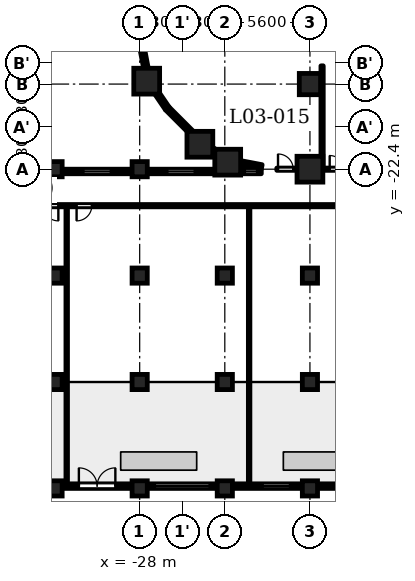
"""IFC4 building model, lengths in metres.
Left out: names, types, materials, properties, quantities, classifications, styles, units other than length and angle.
Written with IfcOpenShell. Run it as: python <this file> out.ifc"""

import sys

from ifc_helpers import new_model, si_unit, direction, frame, frame_2d, origin, origin_2d, place, context, subcontext, project, spatial, polyline, rectangle, circle, outline, extrude, element, fill, save


model = new_model("IFC4")
c1 = context("Model", 3, precision=1e-05, world=origin(), true_north=direction((0.0, 1.0)))
c2 = subcontext(c1, "Body", "Model", "MODEL_VIEW")
j1 = project(units=[si_unit("LENGTHUNIT", "METRE"), si_unit("PLANEANGLEUNIT", "RADIAN")], contexts=[c1])
p1 = place(None, origin())
s1 = spatial("IfcSite", under=j1, at=p1, CompositionType="ELEMENT")
p2 = place(p1, origin())
s2 = spatial("IfcBuilding", under=s1, at=p2, CompositionType="ELEMENT")
p3 = place(p2, frame((0.0, 0.0, 16.1)))
s3 = spatial("IfcBuildingStorey", under=s2, at=p3, CompositionType="ELEMENT", Elevation=16.1)
for number, where, z_axis, x_axis in (
    (1, (-22.209, -21.938, 0.0), (0.0, 0.0, 1.0), (1.0, 0.0, 0.0)),
    (2, (-16.8, -22.4, 0.0), (0.0, 0.0, 1.0), (1.0, 0.0, 0.0)),
    (3, (-27.538, -16.609, 0.0), (0.0, 0.0, 1.0), (1.0, 0.0, 0.0)),
    (4, (-24.04, -20.76, 0.0), (0.0, 0.0, 1.0), (1.0, 0.0, 0.0)),
):
    element("IfcColumn", number, at=place(p3, frame(where, z_axis=z_axis, x_axis=x_axis)), inside=s3, PredefinedType="COLUMN", context=c2, shape_type="SweptSolid", body=[
        extrude(rectangle(XDim=1.7, YDim=1.7, at=origin_2d()), origin(), (0.0, 0.0, 1.0), 4.8),
    ])
p4 = place(p3, frame((-16.8, -16.8, 0.0), z_axis=(0.0, 0.0, 1.0), x_axis=(1.0, 0.0, 0.0)))
e5 = element("IfcColumn", 5, at=p4, inside=s3, PredefinedType="COLUMN", context=c2, shape_type="SweptSolid", body=[
    extrude(rectangle(XDim=1.4, YDim=1.4, at=origin_2d()), origin(), (0.0, 0.0, 1.0), 4.8),
])
for number, where, z_axis, x_axis in (
    (6, (-33.6, -29.4, 0.0), (0.0, 0.0, 1.0), (1.0, 0.0, 0.0)),
    (7, (-28.0, -29.4, 0.0), (0.0, 0.0, 1.0), (1.0, 0.0, 0.0)),
    (8, (-22.4, -29.4, 0.0), (0.0, 0.0, 1.0), (1.0, 0.0, 0.0)),
    (9, (-16.8, -29.4, 0.0), (0.0, 0.0, 1.0), (1.0, 0.0, 0.0)),
    (10, (-33.6, -36.4, 0.0), (0.0, 0.0, 1.0), (1.0, 0.0, 0.0)),
    (11, (-28.0, -36.4, 0.0), (0.0, 0.0, 1.0), (1.0, 0.0, 0.0)),
    (12, (-22.4, -36.4, 0.0), (0.0, 0.0, 1.0), (1.0, 0.0, 0.0)),
    (13, (-16.8, -36.4, 0.0), (0.0, 0.0, 1.0), (1.0, 0.0, 0.0)),
    (14, (-33.6, -43.4, 0.0), (0.0, 0.0, 1.0), (1.0, 0.0, 0.0)),
    (15, (-28.0, -43.4, 0.0), (0.0, 0.0, 1.0), (1.0, 0.0, 0.0)),
    (16, (-22.4, -43.4, 0.0), (0.0, 0.0, 1.0), (1.0, 0.0, 0.0)),
    (17, (-16.8, -43.4, 0.0), (0.0, 0.0, 1.0), (1.0, 0.0, 0.0)),
    (18, (-33.6, -22.4, 0.0), (0.0, 0.0, 1.0), (1.0, 0.0, 0.0)),
    (19, (-28.0, -22.4, 0.0), (0.0, 0.0, 1.0), (1.0, 0.0, 0.0)),
):
    element("IfcColumn", number, at=place(p3, frame(where, z_axis=z_axis, x_axis=x_axis)), inside=s3, PredefinedType="COLUMN", context=c2, shape_type="SweptSolid", body=[
        extrude(circle(Radius=0.5, at=origin_2d()), origin(), (0.0, 0.0, 1.0), 4.8),
    ])
for number, where, z_axis, x_axis in (
    (20, (-27.853, -14.372, 0.0), (0.0, 0.0, 1.0), (0.187, -0.982, 0.0)),
    (21, (-26.969, -17.25, 0.0), (0.0, 0.0, 1.0), (0.562, -0.827, 0.0)),
):
    element("IfcWall", number, at=place(p3, frame(where, z_axis=z_axis, x_axis=x_axis)), inside=s3, PredefinedType="SOLIDWALL", context=c2, shape_type="SweptSolid", body=[
        extrude(rectangle(XDim=1.406, YDim=0.3, at=frame_2d((0.703, 0.0))), origin(), (0.0, 0.0, 1.0), 3.55),
    ])
p5 = place(p3, frame((-26.197, -18.391, 0.0), z_axis=(0.0, 0.0, 1.0), x_axis=(0.707054835785, -0.707158722772, 0.0)))
e22 = element("IfcWall", 22, at=p5, inside=s3, PredefinedType="SOLIDWALL", context=c2, shape_type="SweptSolid", body=[
    extrude(rectangle(XDim=2.35, YDim=0.3, at=frame_2d((1.175, 0.0))), origin(), (0.0, 0.0, 1.0), 3.55),
])
p6 = place(p3, frame((-23.244, -21.101, 0.0), z_axis=(0.0, 0.0, 1.0), x_axis=(0.827135885329, -0.562001981492, 0.0)))
e23 = element("IfcWall", 23, at=p6, inside=s3, PredefinedType="SOLIDWALL", context=c2, shape_type="SweptSolid", body=[
    extrude(rectangle(XDim=0.477, YDim=0.3, at=frame_2d((0.239, 0.0))), origin(), (0.0, 0.0, 1.0), 4.45),
])
p7 = place(p3, frame((-21.353, -21.989, 0.0), z_axis=(0.0, 0.0, 1.0), x_axis=(0.98229142023, -0.187359455971, 0.0)))
e24 = element("IfcWall", 24, at=p7, inside=s3, PredefinedType="SOLIDWALL", context=c2, shape_type="SweptSolid", body=[
    extrude(rectangle(XDim=1.406, YDim=0.3, at=frame_2d((0.703, 0.0))), origin(), (0.0, 0.0, 1.0), 3.55),
])
p8 = place(p3, frame((-20.0, -22.55, 0.0), z_axis=(0.0, 0.0, 1.0), x_axis=(-1.0, 0.0, 0.0)))
e25 = element("IfcWall", 25, at=p8, inside=s3, PredefinedType="SOLIDWALL", context=c2, shape_type="SweptSolid", body=[
    extrude(rectangle(XDim=1.359, YDim=0.3, at=frame_2d((0.679, 0.0))), origin(), (0.0, 0.0, 1.0), 3.55),
])
p9 = place(p8, frame((0.279, 0.0, 0.6)))
e26 = element("IfcOpeningElement", 26, at=p9, cuts=e25, PredefinedType="OPENING", context=c2, shape_type="SweptSolid", body=[
    extrude(rectangle(XDim=0.8, YDim=1.55, at=frame_2d((0.4, 0.775))), frame((0.0, 0.16, 0.0), z_axis=(0.0, -1.0, 0.0), x_axis=(1.0, 0.0, 0.0)), (0.0, 0.0, 1.0), 0.32),
])
p10 = place(p3, frame((-23.059, -22.55, 0.0), z_axis=(0.0, 0.0, 1.0), x_axis=(-1.0, 0.0, 0.0)))
e27 = element("IfcWall", 27, at=p10, inside=s3, PredefinedType="SOLIDWALL", context=c2, shape_type="SweptSolid", body=[
    extrude(rectangle(XDim=4.441, YDim=0.3, at=frame_2d((2.221, 0.0))), origin(), (0.0, 0.0, 1.0), 4.45),
])
p11 = place(p10, frame((1.321, 0.0, 0.9)))
e28 = element("IfcOpeningElement", 28, at=p11, cuts=e27, PredefinedType="OPENING", context=c2, shape_type="SweptSolid", body=[
    extrude(rectangle(XDim=1.8, YDim=1.25, at=frame_2d((0.9, 0.625))), frame((0.0, 0.16, 0.0), z_axis=(0.0, -1.0, 0.0), x_axis=(1.0, 0.0, 0.0)), (0.0, 0.0, 1.0), 0.32),
])
p12 = place(p3, frame((-28.5, -22.55, 0.0), z_axis=(0.0, 0.0, 1.0), x_axis=(-1.0, 0.0, 0.0)))
e29 = element("IfcWall", 29, at=p12, inside=s3, PredefinedType="SOLIDWALL", context=c2, shape_type="SweptSolid", body=[
    extrude(rectangle(XDim=4.6, YDim=0.3, at=frame_2d((2.3, 0.0))), origin(), (0.0, 0.0, 1.0), 4.45),
])
p13 = place(p12, frame((1.4, 0.0, 0.9)))
e30 = element("IfcOpeningElement", 30, at=p13, cuts=e29, PredefinedType="OPENING", context=c2, shape_type="SweptSolid", body=[
    extrude(rectangle(XDim=1.8, YDim=1.25, at=frame_2d((0.9, 0.625))), frame((0.0, 0.16, 0.0), z_axis=(0.0, -1.0, 0.0), x_axis=(1.0, 0.0, 0.0)), (0.0, 0.0, 1.0), 0.32),
])
p14 = place(p3, frame((-33.1, -43.25, 0.0), z_axis=(0.0, 0.0, 1.0), x_axis=(1.0, 0.0, 0.0)))
e31 = element("IfcWall", 31, at=p14, inside=s3, PredefinedType="SOLIDWALL", context=c2, shape_type="SweptSolid", body=[
    extrude(rectangle(XDim=4.6, YDim=0.3, at=frame_2d((2.3, 0.0))), origin(), (0.0, 0.0, 1.0), 3.65),
])
p15 = place(p14, frame((1.1, 0.0, 0.0)))
e32 = element("IfcOpeningElement", 32, at=p15, cuts=e31, PredefinedType="OPENING", context=c2, shape_type="SweptSolid", body=[
    extrude(rectangle(XDim=2.4, YDim=2.3, at=frame_2d((1.2, 1.15))), frame((0.0, 0.16, 0.0), z_axis=(0.0, -1.0, 0.0), x_axis=(1.0, 0.0, 0.0)), (0.0, 0.0, 1.0), 0.32),
])
p16 = place(p3, frame((-27.5, -43.25, 0.0), z_axis=(0.0, 0.0, 1.0), x_axis=(1.0, 0.0, 0.0)))
e33 = element("IfcWall", 33, at=p16, inside=s3, PredefinedType="SOLIDWALL", context=c2, shape_type="SweptSolid", body=[
    extrude(rectangle(XDim=4.6, YDim=0.3, at=frame_2d((2.3, 0.0))), origin(), (0.0, 0.0, 1.0), 3.65),
])
p17 = place(p16, frame((0.5, 0.0, 1.2)))
e34 = element("IfcOpeningElement", 34, at=p17, cuts=e33, PredefinedType="OPENING", context=c2, shape_type="SweptSolid", body=[
    extrude(rectangle(XDim=3.6, YDim=0.95, at=frame_2d((1.8, 0.475))), frame((0.0, 0.16, 0.0), z_axis=(0.0, -1.0, 0.0), x_axis=(1.0, 0.0, 0.0)), (0.0, 0.0, 1.0), 0.32),
])
p18 = place(p3, frame((-21.9, -43.25, 0.0), z_axis=(0.0, 0.0, 1.0), x_axis=(1.0, 0.0, 0.0)))
e35 = element("IfcWall", 35, at=p18, inside=s3, PredefinedType="SOLIDWALL", context=c2, shape_type="SweptSolid", body=[
    extrude(rectangle(XDim=4.6, YDim=0.3, at=frame_2d((2.3, 0.0))), origin(), (0.0, 0.0, 1.0), 3.65),
])
p19 = place(p18, frame((1.988, 0.0, 0.9)))
e36 = element("IfcOpeningElement", 36, at=p19, cuts=e35, PredefinedType="OPENING", context=c2, shape_type="SweptSolid", body=[
    extrude(rectangle(XDim=1.8, YDim=1.25, at=frame_2d((0.9, 0.625))), frame((0.0, 0.16, 0.0), z_axis=(0.0, -1.0, 0.0), x_axis=(1.0, 0.0, 0.0)), (0.0, 0.0, 1.0), 0.32),
])
p20 = place(p3, frame((-16.3, -43.25, 0.0), z_axis=(0.0, 0.0, 1.0), x_axis=(1.0, 0.0, 0.0)))
e37 = element("IfcWall", 37, at=p20, inside=s3, PredefinedType="SOLIDWALL", context=c2, shape_type="SweptSolid", body=[
    extrude(rectangle(XDim=4.6, YDim=0.3, at=frame_2d((2.3, 0.0))), origin(), (0.0, 0.0, 1.0), 3.65),
])
p21 = place(p20, frame((1.7, 0.0, 0.6)))
e38 = element("IfcOpeningElement", 38, at=p21, cuts=e37, PredefinedType="OPENING", context=c2, shape_type="SweptSolid", body=[
    extrude(rectangle(XDim=1.2, YDim=1.55, at=frame_2d((0.6, 0.775))), frame((0.0, 0.16, 0.0), z_axis=(0.0, -1.0, 0.0), x_axis=(1.0, 0.0, 0.0)), (0.0, 0.0, 1.0), 0.32),
])
p22 = place(p3, frame((-37.0, -24.8, 0.0), z_axis=(0.0, 0.0, 1.0), x_axis=(1.0, 0.0, 0.0)))
e39 = element("IfcWall", 39, at=p22, inside=s3, PredefinedType="PARTITIONING", context=c2, shape_type="SweptSolid", body=[
    extrude(rectangle(XDim=74.0, YDim=0.15, at=frame_2d((37.0, 0.0))), origin(), (0.0, 0.0, 1.0), 4.45),
])
p23 = place(p22, frame((2.65, 0.0, 0.0)))
e40 = element("IfcOpeningElement", 40, at=p23, cuts=e39, PredefinedType="OPENING", context=c2, shape_type="SweptSolid", body=[
    extrude(rectangle(XDim=1.0, YDim=2.1, at=frame_2d((0.5, 1.05))), frame((0.0, 0.085, 0.0), z_axis=(0.0, -1.0, 0.0), x_axis=(1.0, 0.0, 0.0)), (0.0, 0.0, 1.0), 0.17),
])
p24 = place(p22, frame((4.85, 0.0, 0.0)))
e41 = element("IfcOpeningElement", 41, at=p24, cuts=e39, PredefinedType="OPENING", context=c2, shape_type="SweptSolid", body=[
    extrude(rectangle(XDim=1.0, YDim=2.1, at=frame_2d((0.5, 1.05))), frame((0.0, 0.085, 0.0), z_axis=(0.0, -1.0, 0.0), x_axis=(1.0, 0.0, 0.0)), (0.0, 0.0, 1.0), 0.17),
])
p25 = place(p22, frame((35.35, 0.0, 0.0)))
e42 = element("IfcOpeningElement", 42, at=p25, cuts=e39, PredefinedType="OPENING", context=c2, shape_type="SweptSolid", body=[
    extrude(rectangle(XDim=1.0, YDim=2.1, at=frame_2d((0.5, 1.05))), frame((0.0, 0.085, 0.0), z_axis=(0.0, -1.0, 0.0), x_axis=(1.0, 0.0, 0.0)), (0.0, 0.0, 1.0), 0.17),
])
p26 = place(p22, frame((37.65, 0.0, 0.0)))
e43 = element("IfcOpeningElement", 43, at=p26, cuts=e39, PredefinedType="OPENING", context=c2, shape_type="SweptSolid", body=[
    extrude(rectangle(XDim=1.0, YDim=2.1, at=frame_2d((0.5, 1.05))), frame((0.0, 0.085, 0.0), z_axis=(0.0, -1.0, 0.0), x_axis=(1.0, 0.0, 0.0)), (0.0, 0.0, 1.0), 0.17),
])
p27 = place(p22, frame((55.4, 0.0, 0.0)))
e44 = element("IfcOpeningElement", 44, at=p27, cuts=e39, PredefinedType="OPENING", context=c2, shape_type="SweptSolid", body=[
    extrude(rectangle(XDim=1.0, YDim=2.1, at=frame_2d((0.5, 1.05))), frame((0.0, 0.085, 0.0), z_axis=(0.0, -1.0, 0.0), x_axis=(1.0, 0.0, 0.0)), (0.0, 0.0, 1.0), 0.17),
])
p28 = place(p22, frame((57.645, 0.0, 0.0)))
e45 = element("IfcOpeningElement", 45, at=p28, cuts=e39, PredefinedType="OPENING", context=c2, shape_type="SweptSolid", body=[
    extrude(rectangle(XDim=1.0, YDim=2.1, at=frame_2d((0.5, 1.05))), frame((0.0, 0.085, 0.0), z_axis=(0.0, -1.0, 0.0), x_axis=(1.0, 0.0, 0.0)), (0.0, 0.0, 1.0), 0.17),
])
p29 = place(p22, frame((72.4, 0.0, 0.0)))
e46 = element("IfcOpeningElement", 46, at=p29, cuts=e39, PredefinedType="OPENING", context=c2, shape_type="SweptSolid", body=[
    extrude(rectangle(XDim=1.0, YDim=2.1, at=frame_2d((0.5, 1.05))), frame((0.0, 0.085, 0.0), z_axis=(0.0, -1.0, 0.0), x_axis=(1.0, 0.0, 0.0)), (0.0, 0.0, 1.0), 0.17),
])
p30 = place(p3, frame((-18.98, -22.4, 0.0), z_axis=(0.0, 0.0, 1.0), x_axis=(1.0, 0.0, 0.0)))
e47 = element("IfcWall", 47, at=p30, inside=s3, PredefinedType="PARTITIONING", context=c2, shape_type="SweptSolid", body=[
    extrude(rectangle(XDim=38.211, YDim=0.15, at=frame_2d((19.105, 0.0))), origin(), (0.0, 0.0, 1.0), 3.55),
])
p31 = place(p30, frame((21.18, 0.0, 0.0)))
e48 = element("IfcOpeningElement", 48, at=p31, cuts=e47, PredefinedType="OPENING", context=c2, shape_type="SweptSolid", body=[
    extrude(rectangle(XDim=1.2, YDim=2.1, at=frame_2d((0.6, 1.05))), frame((0.0, 0.085, 0.0), z_axis=(0.0, -1.0, 0.0), x_axis=(1.0, 0.0, 0.0)), (0.0, 0.0, 1.0), 0.17),
])
p32 = place(p30, frame((0.08, 0.0, 0.0)))
e49 = element("IfcOpeningElement", 49, at=p32, cuts=e47, PredefinedType="OPENING", context=c2, shape_type="SweptSolid", body=[
    extrude(rectangle(XDim=1.0, YDim=2.1, at=frame_2d((0.5, 1.05))), frame((0.0, 0.085, 0.0), z_axis=(0.0, -1.0, 0.0), x_axis=(1.0, 0.0, 0.0)), (0.0, 0.0, 1.0), 0.17),
])
p33 = place(p30, frame((3.48, 0.0, 0.0)))
e50 = element("IfcOpeningElement", 50, at=p33, cuts=e47, PredefinedType="OPENING", context=c2, shape_type="SweptSolid", body=[
    extrude(rectangle(XDim=0.9, YDim=2.1, at=frame_2d((0.45, 1.05))), frame((0.0, 0.085, 0.0), z_axis=(0.0, -1.0, 0.0), x_axis=(1.0, 0.0, 0.0)), (0.0, 0.0, 1.0), 0.17),
])
p34 = place(p30, frame((27.93, 0.0, 0.0)))
e51 = element("IfcOpeningElement", 51, at=p34, cuts=e47, PredefinedType="OPENING", context=c2, shape_type="SweptSolid", body=[
    extrude(rectangle(XDim=0.9, YDim=2.1, at=frame_2d((0.45, 1.05))), frame((0.0, 0.085, 0.0), z_axis=(0.0, -1.0, 0.0), x_axis=(1.0, 0.0, 0.0)), (0.0, 0.0, 1.0), 0.17),
])
p35 = place(p30, frame((31.18, 0.0, 0.0)))
e52 = element("IfcOpeningElement", 52, at=p35, cuts=e47, PredefinedType="OPENING", context=c2, shape_type="SweptSolid", body=[
    extrude(rectangle(XDim=0.9, YDim=2.1, at=frame_2d((0.45, 1.05))), frame((0.0, 0.085, 0.0), z_axis=(0.0, -1.0, 0.0), x_axis=(1.0, 0.0, 0.0)), (0.0, 0.0, 1.0), 0.17),
])
p36 = place(p30, frame((33.88, 0.0, 0.0)))
e53 = element("IfcOpeningElement", 53, at=p36, cuts=e47, PredefinedType="OPENING", context=c2, shape_type="SweptSolid", body=[
    extrude(rectangle(XDim=0.9, YDim=2.1, at=frame_2d((0.45, 1.05))), frame((0.0, 0.085, 0.0), z_axis=(0.0, -1.0, 0.0), x_axis=(1.0, 0.0, 0.0)), (0.0, 0.0, 1.0), 0.17),
])
p37 = place(p30, frame((37.231, 0.0, 0.0)))
e54 = element("IfcOpeningElement", 54, at=p37, cuts=e47, PredefinedType="OPENING", context=c2, shape_type="SweptSolid", body=[
    extrude(rectangle(XDim=0.9, YDim=2.1, at=frame_2d((0.45, 1.05))), frame((0.0, 0.085, 0.0), z_axis=(0.0, -1.0, 0.0), x_axis=(1.0, 0.0, 0.0)), (0.0, 0.0, 1.0), 0.17),
])
for number, where, z_axis, x_axis in (
    (55, (-32.8, -43.08, 0.0), (0.0, 0.0, 1.0), (0.0, 1.0, 0.0)),
    (56, (-20.8, -43.08, 0.0), (0.0, 0.0, 1.0), (0.0, 1.0, 0.0)),
):
    element("IfcWall", number, at=place(p3, frame(where, z_axis=z_axis, x_axis=x_axis)), inside=s3, PredefinedType="PARTITIONING", context=c2, shape_type="SweptSolid", body=[
        extrude(rectangle(XDim=18.205, YDim=0.1, at=frame_2d((9.103, 0.0))), origin(), (0.0, 0.0, 1.0), 4.45),
    ])
p38 = place(p3, frame((-16.0, -22.325, 0.0), z_axis=(0.0, 0.0, 1.0), x_axis=(0.0, 1.0, 0.0)))
e57 = element("IfcWall", 57, at=p38, inside=s3, PredefinedType="PARTITIONING", context=c2, shape_type="SweptSolid", body=[
    extrude(rectangle(XDim=6.725, YDim=0.15, at=frame_2d((3.362, 0.0))), origin(), (0.0, 0.0, 1.0), 4.45),
])
p39 = place(p3, origin())
e58 = element("IfcWall", 58, at=p39, inside=s3, PredefinedType="SOLIDWALL", context=c2, shape_type="SweptSolid", body=[
    extrude(outline(polyline([(-20.0, -22.7), (-19.0, -22.7), (-19.0, -22.285), (-19.944, -22.105), (-20.0, -22.4), (-20.0, -22.7)])), origin(), (0.0, 0.0, 1.0), 3.55),
])
p40 = place(p15, origin())
e59 = element("IfcDoor", 59, at=p40, inside=s3, OperationType="SINGLE_SWING_LEFT", PredefinedType="DOOR", context=c2, shape_type="SweptSolid", body=[
    extrude(rectangle(XDim=2.4, YDim=2.3, at=frame_2d((1.2, 1.15))), frame((0.0, 0.025, 0.0), z_axis=(0.0, -1.0, 0.0), x_axis=(1.0, 0.0, 0.0)), (0.0, 0.0, 1.0), 0.05),
])
fill(e32, e59)
p41 = place(p23, origin())
e60 = element("IfcDoor", 60, at=p41, inside=s3, OperationType="SINGLE_SWING_RIGHT", PredefinedType="DOOR", context=c2, shape_type="SweptSolid", body=[
    extrude(rectangle(XDim=1.0, YDim=2.1, at=frame_2d((0.5, 1.05))), frame((0.0, 0.025, 0.0), z_axis=(0.0, -1.0, 0.0), x_axis=(1.0, 0.0, 0.0)), (0.0, 0.0, 1.0), 0.05),
])
fill(e40, e60)
p42 = place(p24, origin())
e61 = element("IfcDoor", 61, at=p42, inside=s3, OperationType="SINGLE_SWING_LEFT", PredefinedType="DOOR", context=c2, shape_type="SweptSolid", body=[
    extrude(rectangle(XDim=1.0, YDim=2.1, at=frame_2d((0.5, 1.05))), frame((0.0, 0.025, 0.0), z_axis=(0.0, -1.0, 0.0), x_axis=(1.0, 0.0, 0.0)), (0.0, 0.0, 1.0), 0.05),
])
fill(e41, e61)
p43 = place(p32, origin())
e62 = element("IfcDoor", 62, at=p43, inside=s3, OperationType="SINGLE_SWING_RIGHT", PredefinedType="DOOR", context=c2, shape_type="SweptSolid", body=[
    extrude(rectangle(XDim=1.0, YDim=2.1, at=frame_2d((0.5, 1.05))), frame((0.0, 0.025, 0.0), z_axis=(0.0, -1.0, 0.0), x_axis=(1.0, 0.0, 0.0)), (0.0, 0.0, 1.0), 0.05),
])
fill(e49, e62)
p44 = place(p33, origin())
e63 = element("IfcDoor", 63, at=p44, inside=s3, OperationType="SINGLE_SWING_RIGHT", PredefinedType="DOOR", context=c2, shape_type="SweptSolid", body=[
    extrude(rectangle(XDim=0.9, YDim=2.1, at=frame_2d((0.45, 1.05))), frame((0.0, 0.025, 0.0), z_axis=(0.0, -1.0, 0.0), x_axis=(1.0, 0.0, 0.0)), (0.0, 0.0, 1.0), 0.05),
])
fill(e50, e63)
p45 = place(p9, origin())
e64 = element("IfcWindow", 64, at=p45, inside=s3, PartitioningType="SINGLE_PANEL", PredefinedType="WINDOW", context=c2, shape_type="SweptSolid", body=[
    extrude(rectangle(XDim=0.8, YDim=1.55, at=frame_2d((0.4, 0.775))), frame((0.0, 0.03, 0.0), z_axis=(0.0, -1.0, 0.0), x_axis=(1.0, 0.0, 0.0)), (0.0, 0.0, 1.0), 0.06),
])
fill(e26, e64)
p46 = place(p11, origin())
e65 = element("IfcWindow", 65, at=p46, inside=s3, PartitioningType="SINGLE_PANEL", PredefinedType="WINDOW", context=c2, shape_type="SweptSolid", body=[
    extrude(rectangle(XDim=1.8, YDim=1.25, at=frame_2d((0.9, 0.625))), frame((0.0, 0.03, 0.0), z_axis=(0.0, -1.0, 0.0), x_axis=(1.0, 0.0, 0.0)), (0.0, 0.0, 1.0), 0.06),
])
fill(e28, e65)
p47 = place(p13, origin())
e66 = element("IfcWindow", 66, at=p47, inside=s3, PartitioningType="SINGLE_PANEL", PredefinedType="WINDOW", context=c2, shape_type="SweptSolid", body=[
    extrude(rectangle(XDim=1.8, YDim=1.25, at=frame_2d((0.9, 0.625))), frame((0.0, 0.03, 0.0), z_axis=(0.0, -1.0, 0.0), x_axis=(1.0, 0.0, 0.0)), (0.0, 0.0, 1.0), 0.06),
])
fill(e30, e66)
p48 = place(p17, origin())
e67 = element("IfcWindow", 67, at=p48, inside=s3, PartitioningType="SINGLE_PANEL", PredefinedType="WINDOW", context=c2, shape_type="SweptSolid", body=[
    extrude(rectangle(XDim=3.6, YDim=0.95, at=frame_2d((1.8, 0.475))), frame((0.0, 0.03, 0.0), z_axis=(0.0, -1.0, 0.0), x_axis=(1.0, 0.0, 0.0)), (0.0, 0.0, 1.0), 0.06),
])
fill(e34, e67)
p49 = place(p19, origin())
e68 = element("IfcWindow", 68, at=p49, inside=s3, PartitioningType="SINGLE_PANEL", PredefinedType="WINDOW", context=c2, shape_type="SweptSolid", body=[
    extrude(rectangle(XDim=1.8, YDim=1.25, at=frame_2d((0.9, 0.625))), frame((0.0, 0.03, 0.0), z_axis=(0.0, -1.0, 0.0), x_axis=(1.0, 0.0, 0.0)), (0.0, 0.0, 1.0), 0.06),
])
fill(e36, e68)
save(model, sys.argv[1])
